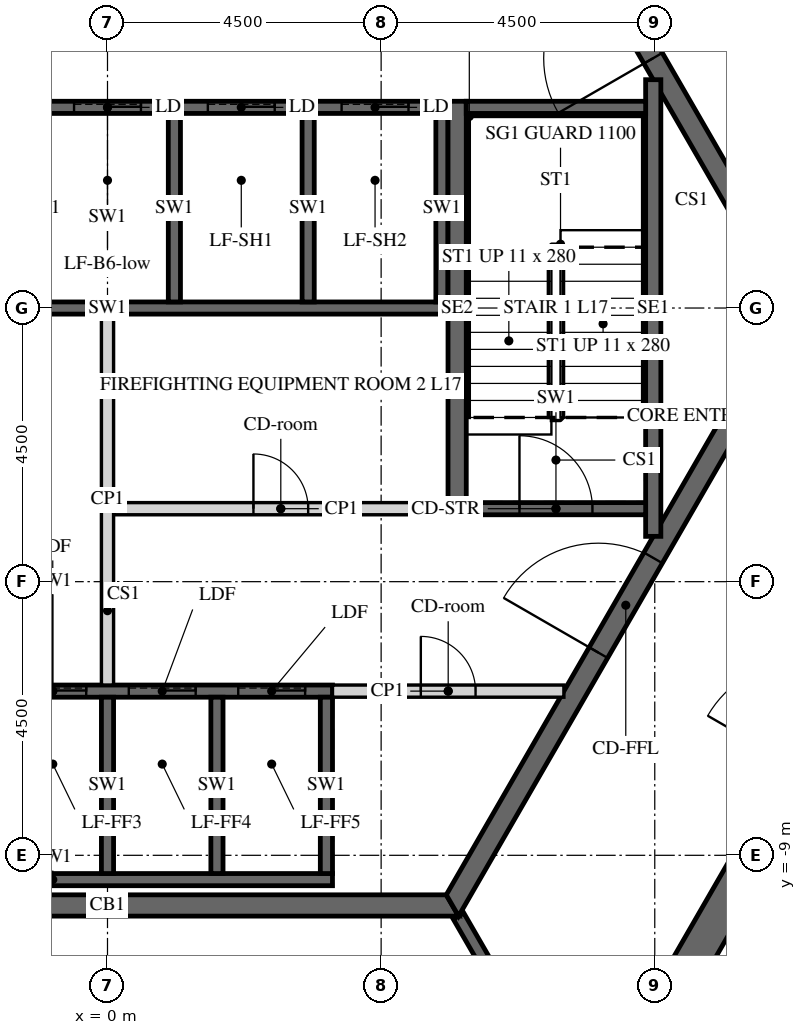
"""IFC4 building model, lengths in metres.
Left out: names, types, materials, properties, quantities, classifications, styles, units other than length and angle.
Written with IfcOpenShell. Run it as: python <this file> out.ifc"""

import sys

from ifc_helpers import new_model, si_unit, direction, frame, frame_2d, origin, place, context, subcontext, project, spatial, polyline, rectangle, outline, extrude, element, fill, save


model = new_model("IFC4")
c1 = context("Model", 3, precision=1e-05, world=origin(), true_north=direction((0.0, 1.0)))
c2 = subcontext(c1, "Body", "Model", "MODEL_VIEW")
j1 = project(units=[si_unit("LENGTHUNIT", "METRE"), si_unit("PLANEANGLEUNIT", "RADIAN")], contexts=[c1])
p1 = place(None, origin())
s1 = spatial("IfcSite", under=j1, at=p1, CompositionType="ELEMENT")
p2 = place(p1, origin())
s2 = spatial("IfcBuilding", under=s1, at=p2, CompositionType="ELEMENT")
p3 = place(p2, frame((0.0, 0.0, 80.4)))
s3 = spatial("IfcBuildingStorey", under=s2, at=p3, CompositionType="ELEMENT", Elevation=80.4)
p4 = place(p3, frame((7.91, -13.7, -0.15), z_axis=(0.0, 0.0, 1.0), x_axis=(0.499999880136, 0.866025472988, 0.0)))
e1 = element("IfcWall", 1, at=p4, inside=s3, PredefinedType="SHEAR", context=c2, shape_type="SweptSolid", body=[
    extrude(outline(polyline([(-0.173, -0.3), (15.993, -0.3), (15.646, 0.3), (0.173, 0.3), (-0.173, -0.3)])), origin(), (0.0, 0.0, 1.0), 3.9),
])
p5 = place(p4, frame((7.039, 0.0, 0.15)))
e2 = element("IfcOpeningElement", 2, at=p5, cuts=e1, PredefinedType="OPENING", context=c2, shape_type="SweptSolid", body=[
    extrude(rectangle(XDim=1.8, YDim=2.4, at=frame_2d((0.9, 1.2))), frame((0.0, 0.31, 0.0), z_axis=(0.0, -1.0, 0.0), x_axis=(1.0, 0.0, 0.0)), (0.0, 0.0, 1.0), 0.62),
])
p6 = place(p3, frame((15.819, 0.0, -0.15), z_axis=(0.0, 0.0, 1.0), x_axis=(-0.499999880136, 0.866025472988, 0.0)))
e3 = element("IfcWall", 3, at=p6, inside=s3, PredefinedType="SHEAR", context=c2, shape_type="SweptSolid", body=[
    extrude(outline(polyline([(-0.173, -0.3), (15.993, -0.3), (15.646, 0.3), (0.173, 0.3), (-0.173, -0.3)])), origin(), (0.0, 0.0, 1.0), 3.9),
])
p7 = place(p6, frame((6.981, 0.0, 0.15)))
e4 = element("IfcOpeningElement", 4, at=p7, cuts=e3, PredefinedType="OPENING", context=c2, shape_type="SweptSolid", body=[
    extrude(rectangle(XDim=1.8, YDim=2.4, at=frame_2d((0.9, 1.2))), frame((0.0, 0.31, 0.0), z_axis=(0.0, -1.0, 0.0), x_axis=(1.0, 0.0, 0.0)), (0.0, 0.0, 1.0), 0.62),
])
p8 = place(p3, frame((-5.673, -9.825, -0.15), z_axis=(0.0, 0.0, 1.0), x_axis=(1.0, 0.0, 0.0)))
e5 = element("IfcWall", 5, at=p8, inside=s3, PredefinedType="SHEAR", context=c2, shape_type="SweptSolid", body=[
    extrude(outline(polyline([(-0.101, -0.175), (11.446, -0.175), (11.244, 0.175), (0.101, 0.175), (-0.101, -0.175)])), origin(), (0.0, 0.0, 1.0), 3.9),
])
p9 = place(p3, frame((5.673, -9.825, -0.15), z_axis=(0.0, 0.0, 1.0), x_axis=(0.499995046907, 0.866028263435, 0.0)))
e6 = element("IfcWall", 6, at=p9, inside=s3, PredefinedType="SHEAR", context=c2, shape_type="SweptSolid", body=[
    extrude(outline(polyline([(-0.101, -0.175), (11.446, -0.175), (11.244, 0.175), (0.101, 0.175), (-0.101, -0.175)])), origin(), (0.0, 0.0, 1.0), 3.9),
])
p10 = place(p9, frame((4.801, 0.0, 0.15)))
e7 = element("IfcOpeningElement", 7, at=p10, cuts=e6, PredefinedType="OPENING", context=c2, shape_type="SweptSolid", body=[
    extrude(rectangle(XDim=1.8, YDim=2.4, at=frame_2d((0.9, 1.2))), frame((0.0, 0.185, 0.0), z_axis=(0.0, -1.0, 0.0), x_axis=(1.0, 0.0, 0.0)), (0.0, 0.0, 1.0), 0.37),
])
p11 = place(p3, frame((11.345, 0.0, -0.15), z_axis=(0.0, 0.0, 1.0), x_axis=(-0.499995046907, 0.866028263435, 0.0)))
e8 = element("IfcWall", 8, at=p11, inside=s3, PredefinedType="SHEAR", context=c2, shape_type="SweptSolid", body=[
    extrude(outline(polyline([(-0.101, -0.175), (11.446, -0.175), (11.244, 0.175), (0.101, 0.175), (-0.101, -0.175)])), origin(), (0.0, 0.0, 1.0), 3.9),
])
p12 = place(p11, frame((4.744, 0.0, 0.15)))
e9 = element("IfcOpeningElement", 9, at=p12, cuts=e8, PredefinedType="OPENING", context=c2, shape_type="SweptSolid", body=[
    extrude(rectangle(XDim=1.8, YDim=2.4, at=frame_2d((0.9, 1.2))), frame((0.0, 0.185, 0.0), z_axis=(0.0, -1.0, 0.0), x_axis=(1.0, 0.0, 0.0)), (0.0, 0.0, 1.0), 0.37),
])
p13 = place(p3, frame((-5.6, 3.3, -0.25), z_axis=(0.0, 0.0, 1.0), x_axis=(1.0, 0.0, 0.0)))
e10 = element("IfcWall", 10, at=p13, inside=s3, PredefinedType="SHEAR", context=c2, shape_type="SweptSolid", body=[
    extrude(rectangle(XDim=11.2, YDim=0.2, at=frame_2d((5.6, 0.0))), origin(), (0.0, 0.0, 1.0), 3.9),
])
p14 = place(p13, frame((0.65, 0.0, 0.25)))
e11 = element("IfcOpeningElement", 11, at=p14, cuts=e10, PredefinedType="OPENING", context=c2, shape_type="SweptSolid", body=[
    extrude(rectangle(XDim=1.1, YDim=2.1, at=frame_2d((0.55, 1.05))), frame((0.0, 0.11, 0.0), z_axis=(0.0, -1.0, 0.0), x_axis=(1.0, 0.0, 0.0)), (0.0, 0.0, 1.0), 0.22),
])
p15 = place(p13, frame((2.85, 0.0, 0.25)))
e12 = element("IfcOpeningElement", 12, at=p15, cuts=e10, PredefinedType="OPENING", context=c2, shape_type="SweptSolid", body=[
    extrude(rectangle(XDim=1.1, YDim=2.1, at=frame_2d((0.55, 1.05))), frame((0.0, 0.11, 0.0), z_axis=(0.0, -1.0, 0.0), x_axis=(1.0, 0.0, 0.0)), (0.0, 0.0, 1.0), 0.22),
])
p16 = place(p13, frame((5.05, 0.0, 0.25)))
e13 = element("IfcOpeningElement", 13, at=p16, cuts=e10, PredefinedType="OPENING", context=c2, shape_type="SweptSolid", body=[
    extrude(rectangle(XDim=1.1, YDim=2.1, at=frame_2d((0.55, 1.05))), frame((0.0, 0.11, 0.0), z_axis=(0.0, -1.0, 0.0), x_axis=(1.0, 0.0, 0.0)), (0.0, 0.0, 1.0), 0.22),
])
p17 = place(p13, frame((7.25, 0.0, 0.25)))
e14 = element("IfcOpeningElement", 14, at=p17, cuts=e10, PredefinedType="OPENING", context=c2, shape_type="SweptSolid", body=[
    extrude(rectangle(XDim=1.1, YDim=2.1, at=frame_2d((0.55, 1.05))), frame((0.0, 0.11, 0.0), z_axis=(0.0, -1.0, 0.0), x_axis=(1.0, 0.0, 0.0)), (0.0, 0.0, 1.0), 0.22),
])
p18 = place(p13, frame((9.45, 0.0, 0.25)))
e15 = element("IfcOpeningElement", 15, at=p18, cuts=e10, PredefinedType="OPENING", context=c2, shape_type="SweptSolid", body=[
    extrude(rectangle(XDim=1.1, YDim=2.1, at=frame_2d((0.55, 1.05))), frame((0.0, 0.11, 0.0), z_axis=(0.0, -1.0, 0.0), x_axis=(1.0, 0.0, 0.0)), (0.0, 0.0, 1.0), 0.22),
])
p19 = place(p3, frame((-5.6, 0.0, -0.25), z_axis=(0.0, 0.0, 1.0), x_axis=(1.0, 0.0, 0.0)))
e16 = element("IfcWall", 16, at=p19, inside=s3, PredefinedType="SHEAR", context=c2, shape_type="SweptSolid", body=[
    extrude(rectangle(XDim=11.2, YDim=0.2, at=frame_2d((5.6, 0.0))), origin(), (0.0, 0.0, 1.0), 3.9),
])
for number, where, z_axis, x_axis in (
    (17, (1.1, 0.1, -0.25), (0.0, 0.0, 1.0), (0.0, 1.0, 0.0)),
    (18, (3.3, 0.1, -0.25), (0.0, 0.0, 1.0), (0.0, 1.0, 0.0)),
    (19, (5.5, 0.1, -0.25), (0.0, 0.0, 1.0), (0.0, 1.0, 0.0)),
):
    element("IfcWall", number, at=place(p3, frame(where, z_axis=z_axis, x_axis=x_axis)), inside=s3, PredefinedType="SHEAR", context=c2, shape_type="SweptSolid", body=[
        extrude(rectangle(XDim=3.1, YDim=0.2, at=frame_2d((1.55, 0.0))), origin(), (0.0, 0.0, 1.0), 3.9),
    ])
p20 = place(p3, frame((-5.5, -6.3, -0.25), z_axis=(0.0, 0.0, 1.0), x_axis=(1.0, 0.0, 0.0)))
e20 = element("IfcWall", 20, at=p20, inside=s3, PredefinedType="SHEAR", context=c2, shape_type="SweptSolid", body=[
    extrude(rectangle(XDim=9.2, YDim=0.2, at=frame_2d((4.6, 0.0))), origin(), (0.0, 0.0, 1.0), 3.9),
])
p21 = place(p20, frame((0.45, 0.0, 0.25)))
e21 = element("IfcOpeningElement", 21, at=p21, cuts=e20, PredefinedType="OPENING", context=c2, shape_type="SweptSolid", body=[
    extrude(rectangle(XDim=1.1, YDim=2.1, at=frame_2d((0.55, 1.05))), frame((0.0, 0.11, 0.0), z_axis=(0.0, -1.0, 0.0), x_axis=(1.0, 0.0, 0.0)), (0.0, 0.0, 1.0), 0.22),
])
p22 = place(p20, frame((2.25, 0.0, 0.25)))
e22 = element("IfcOpeningElement", 22, at=p22, cuts=e20, PredefinedType="OPENING", context=c2, shape_type="SweptSolid", body=[
    extrude(rectangle(XDim=1.1, YDim=2.1, at=frame_2d((0.55, 1.05))), frame((0.0, 0.11, 0.0), z_axis=(0.0, -1.0, 0.0), x_axis=(1.0, 0.0, 0.0)), (0.0, 0.0, 1.0), 0.22),
])
p23 = place(p20, frame((4.05, 0.0, 0.25)))
e23 = element("IfcOpeningElement", 23, at=p23, cuts=e20, PredefinedType="OPENING", context=c2, shape_type="SweptSolid", body=[
    extrude(rectangle(XDim=1.1, YDim=2.1, at=frame_2d((0.55, 1.05))), frame((0.0, 0.11, 0.0), z_axis=(0.0, -1.0, 0.0), x_axis=(1.0, 0.0, 0.0)), (0.0, 0.0, 1.0), 0.22),
])
p24 = place(p20, frame((5.85, 0.0, 0.25)))
e24 = element("IfcOpeningElement", 24, at=p24, cuts=e20, PredefinedType="OPENING", context=c2, shape_type="SweptSolid", body=[
    extrude(rectangle(XDim=1.1, YDim=2.1, at=frame_2d((0.55, 1.05))), frame((0.0, 0.11, 0.0), z_axis=(0.0, -1.0, 0.0), x_axis=(1.0, 0.0, 0.0)), (0.0, 0.0, 1.0), 0.22),
])
p25 = place(p20, frame((7.65, 0.0, 0.25)))
e25 = element("IfcOpeningElement", 25, at=p25, cuts=e20, PredefinedType="OPENING", context=c2, shape_type="SweptSolid", body=[
    extrude(rectangle(XDim=1.1, YDim=2.1, at=frame_2d((0.55, 1.05))), frame((0.0, 0.11, 0.0), z_axis=(0.0, -1.0, 0.0), x_axis=(1.0, 0.0, 0.0)), (0.0, 0.0, 1.0), 0.22),
])
p26 = place(p3, frame((-5.5, -9.4, -0.25), z_axis=(0.0, 0.0, 1.0), x_axis=(1.0, 0.0, 0.0)))
e26 = element("IfcWall", 26, at=p26, inside=s3, PredefinedType="SHEAR", context=c2, shape_type="SweptSolid", body=[
    extrude(rectangle(XDim=9.2, YDim=0.2, at=frame_2d((4.6, 0.0))), origin(), (0.0, 0.0, 1.0), 3.9),
])
for number, where, z_axis, x_axis in (
    (27, (0.0, -9.3, -0.25), (0.0, 0.0, 1.0), (0.0, 1.0, 0.0)),
    (28, (1.8, -9.3, -0.25), (0.0, 0.0, 1.0), (0.0, 1.0, 0.0)),
    (29, (3.6, -9.3, -0.25), (0.0, 0.0, 1.0), (0.0, 1.0, 0.0)),
):
    element("IfcWall", number, at=place(p3, frame(where, z_axis=z_axis, x_axis=x_axis)), inside=s3, PredefinedType="SHEAR", context=c2, shape_type="SweptSolid", body=[
        extrude(rectangle(XDim=2.9, YDim=0.2, at=frame_2d((1.45, 0.0))), origin(), (0.0, 0.0, 1.0), 3.9),
    ])
p27 = place(p3, frame((0.1, -3.3, 0.0), z_axis=(0.0, 0.0, 1.0), x_axis=(1.0, 0.0, 0.0)))
e30 = element("IfcWall", 30, at=p27, inside=s3, PredefinedType="PARTITIONING", context=c2, shape_type="SweptSolid", body=[
    extrude(rectangle(XDim=5.5, YDim=0.2, at=frame_2d((2.75, 0.0))), origin(), (0.0, 0.0, 1.0), 3.65),
])
p28 = place(p27, frame((2.3, 0.0, 0.0)))
e31 = element("IfcOpeningElement", 31, at=p28, cuts=e30, PredefinedType="OPENING", context=c2, shape_type="SweptSolid", body=[
    extrude(rectangle(XDim=0.9, YDim=2.1, at=frame_2d((0.45, 1.05))), frame((0.0, 0.11, 0.0), z_axis=(0.0, -1.0, 0.0), x_axis=(1.0, 0.0, 0.0)), (0.0, 0.0, 1.0), 0.22),
])
p29 = place(p3, frame((0.0, -6.2, 0.0), z_axis=(0.0, 0.0, 1.0), x_axis=(0.0, 1.0, 0.0)))
e32 = element("IfcWall", 32, at=p29, inside=s3, PredefinedType="PARTITIONING", context=c2, shape_type="SweptSolid", body=[
    extrude(rectangle(XDim=6.1, YDim=0.2, at=frame_2d((3.05, 0.0))), origin(), (0.0, 0.0, 1.0), 3.65),
])
p30 = place(p3, frame((3.7, -6.3, 0.0), z_axis=(0.0, 0.0, 1.0), x_axis=(1.0, 0.0, 0.0)))
e33 = element("IfcWall", 33, at=p30, inside=s3, PredefinedType="PARTITIONING", context=c2, shape_type="SweptSolid", body=[
    extrude(rectangle(XDim=3.806, YDim=0.2, at=frame_2d((1.903, 0.0))), origin(), (0.0, 0.0, 1.0), 3.65),
])
p31 = place(p30, frame((1.453, 0.0, 0.0)))
e34 = element("IfcOpeningElement", 34, at=p31, cuts=e33, PredefinedType="OPENING", context=c2, shape_type="SweptSolid", body=[
    extrude(rectangle(XDim=0.9, YDim=2.1, at=frame_2d((0.45, 1.05))), frame((0.0, 0.11, 0.0), z_axis=(0.0, -1.0, 0.0), x_axis=(1.0, 0.0, 0.0)), (0.0, 0.0, 1.0), 0.22),
])
p32 = place(p3, frame((5.773, -10.0, -0.15), z_axis=(0.0, 0.0, 1.0), x_axis=(0.500038251005, -0.86600331843, 0.0)))
e35 = element("IfcWall", 35, at=p32, inside=s3, PredefinedType="SHEAR", context=c2, shape_type="SweptSolid", body=[
    extrude(rectangle(XDim=3.926, YDim=0.2, at=frame_2d((1.963, 0.0))), origin(), (0.0, 0.0, 1.0), 3.9),
])
p33 = place(p3, frame((5.75, -3.4, -0.25), z_axis=(0.0, 0.0, 1.0), x_axis=(0.0, 1.0, 0.0)))
e36 = element("IfcWall", 36, at=p33, inside=s3, PredefinedType="SHEAR", context=c2, shape_type="SweptSolid", body=[
    extrude(rectangle(XDim=6.8, YDim=0.3, at=frame_2d((3.4, 0.0))), origin(), (0.0, 0.0, 1.0), 3.9),
])
p34 = place(p3, frame((8.975, -3.755, -0.25), z_axis=(0.0, 0.0, 1.0), x_axis=(0.0, 1.0, 0.0)))
e37 = element("IfcWall", 37, at=p34, inside=s3, PredefinedType="SHEAR", context=c2, shape_type="SweptSolid", body=[
    extrude(rectangle(XDim=7.51, YDim=0.25, at=frame_2d((3.755, 0.0))), origin(), (0.0, 0.0, 1.0), 3.9),
])
p35 = place(p3, frame((5.9, 3.3, -0.25), z_axis=(0.0, 0.0, 1.0), x_axis=(1.0, 0.0, 0.0)))
e38 = element("IfcWall", 38, at=p35, inside=s3, PredefinedType="SHEAR", context=c2, shape_type="SweptSolid", body=[
    extrude(rectangle(XDim=2.95, YDim=0.2, at=frame_2d((1.475, 0.0))), origin(), (0.0, 0.0, 1.0), 3.9),
])
p36 = place(p3, frame((5.9, -3.3, -0.25), z_axis=(0.0, 0.0, 1.0), x_axis=(1.0, 0.0, 0.0)))
e39 = element("IfcWall", 39, at=p36, inside=s3, PredefinedType="SHEAR", context=c2, shape_type="SweptSolid", body=[
    extrude(rectangle(XDim=2.95, YDim=0.2, at=frame_2d((1.475, 0.0))), origin(), (0.0, 0.0, 1.0), 3.9),
])
p37 = place(p36, frame((0.875, 0.0, 0.25)))
e40 = element("IfcOpeningElement", 40, at=p37, cuts=e39, PredefinedType="OPENING", context=c2, shape_type="SweptSolid", body=[
    extrude(rectangle(XDim=1.2, YDim=2.4, at=frame_2d((0.6, 1.2))), frame((0.0, 0.11, 0.0), z_axis=(0.0, -1.0, 0.0), x_axis=(1.0, 0.0, 0.0)), (0.0, 0.0, 1.0), 0.22),
])
p38 = place(p12, origin())
e41 = element("IfcDoor", 41, at=p38, inside=s3, OperationType="DOUBLE_DOOR_SINGLE_SWING", PredefinedType="DOOR", context=c2, shape_type="SweptSolid", body=[
    extrude(rectangle(XDim=1.8, YDim=2.4, at=frame_2d((0.9, 1.2))), frame((0.0, 0.025, 0.0), z_axis=(0.0, -1.0, 0.0), x_axis=(1.0, 0.0, 0.0)), (0.0, 0.0, 1.0), 0.05),
])
fill(e9, e41)
p39 = place(p10, origin())
e42 = element("IfcDoor", 42, at=p39, inside=s3, OperationType="DOUBLE_DOOR_SINGLE_SWING", PredefinedType="DOOR", context=c2, shape_type="SweptSolid", body=[
    extrude(rectangle(XDim=1.8, YDim=2.4, at=frame_2d((0.9, 1.2))), frame((0.0, 0.025, 0.0), z_axis=(0.0, -1.0, 0.0), x_axis=(1.0, 0.0, 0.0)), (0.0, 0.0, 1.0), 0.05),
])
fill(e7, e42)
p40 = place(p28, origin())
e43 = element("IfcDoor", 43, at=p40, inside=s3, OperationType="SINGLE_SWING_LEFT", PredefinedType="DOOR", context=c2, shape_type="SweptSolid", body=[
    extrude(rectangle(XDim=0.9, YDim=2.1, at=frame_2d((0.45, 1.05))), frame((0.0, 0.025, 0.0), z_axis=(0.0, -1.0, 0.0), x_axis=(1.0, 0.0, 0.0)), (0.0, 0.0, 1.0), 0.05),
])
fill(e31, e43)
p41 = place(p31, origin())
e44 = element("IfcDoor", 44, at=p41, inside=s3, OperationType="SINGLE_SWING_LEFT", PredefinedType="DOOR", context=c2, shape_type="SweptSolid", body=[
    extrude(rectangle(XDim=0.9, YDim=2.1, at=frame_2d((0.45, 1.05))), frame((0.0, 0.025, 0.0), z_axis=(0.0, -1.0, 0.0), x_axis=(1.0, 0.0, 0.0)), (0.0, 0.0, 1.0), 0.05),
])
fill(e34, e44)
p42 = place(p37, origin())
e45 = element("IfcDoor", 45, at=p42, inside=s3, OperationType="SINGLE_SWING_LEFT", PredefinedType="DOOR", context=c2, shape_type="SweptSolid", body=[
    extrude(rectangle(XDim=1.2, YDim=2.4, at=frame_2d((0.6, 1.2))), frame((0.0, 0.025, 0.0), z_axis=(0.0, -1.0, 0.0), x_axis=(1.0, 0.0, 0.0)), (0.0, 0.0, 1.0), 0.05),
])
fill(e40, e45)
p43 = place(p16, origin())
e46 = element("IfcDoor", 46, at=p43, inside=s3, OperationType="SLIDING_TO_LEFT", PredefinedType="DOOR", context=c2, shape_type="SweptSolid", body=[
    extrude(rectangle(XDim=1.1, YDim=2.1, at=frame_2d((0.55, 1.05))), frame((0.0, 0.025, 0.0), z_axis=(0.0, -1.0, 0.0), x_axis=(1.0, 0.0, 0.0)), (0.0, 0.0, 1.0), 0.05),
])
fill(e13, e46)
p44 = place(p17, origin())
e47 = element("IfcDoor", 47, at=p44, inside=s3, OperationType="SLIDING_TO_LEFT", PredefinedType="DOOR", context=c2, shape_type="SweptSolid", body=[
    extrude(rectangle(XDim=1.1, YDim=2.1, at=frame_2d((0.55, 1.05))), frame((0.0, 0.025, 0.0), z_axis=(0.0, -1.0, 0.0), x_axis=(1.0, 0.0, 0.0)), (0.0, 0.0, 1.0), 0.05),
])
fill(e14, e47)
p45 = place(p18, origin())
e48 = element("IfcDoor", 48, at=p45, inside=s3, OperationType="SLIDING_TO_LEFT", PredefinedType="DOOR", context=c2, shape_type="SweptSolid", body=[
    extrude(rectangle(XDim=1.1, YDim=2.1, at=frame_2d((0.55, 1.05))), frame((0.0, 0.025, 0.0), z_axis=(0.0, -1.0, 0.0), x_axis=(1.0, 0.0, 0.0)), (0.0, 0.0, 1.0), 0.05),
])
fill(e15, e48)
p46 = place(p23, origin())
e49 = element("IfcDoor", 49, at=p46, inside=s3, OperationType="SLIDING_TO_LEFT", PredefinedType="DOOR", context=c2, shape_type="SweptSolid", body=[
    extrude(rectangle(XDim=1.1, YDim=2.1, at=frame_2d((0.55, 1.05))), frame((0.0, 0.025, 0.0), z_axis=(0.0, -1.0, 0.0), x_axis=(1.0, 0.0, 0.0)), (0.0, 0.0, 1.0), 0.05),
])
fill(e23, e49)
p47 = place(p24, origin())
e50 = element("IfcDoor", 50, at=p47, inside=s3, OperationType="SLIDING_TO_LEFT", PredefinedType="DOOR", context=c2, shape_type="SweptSolid", body=[
    extrude(rectangle(XDim=1.1, YDim=2.1, at=frame_2d((0.55, 1.05))), frame((0.0, 0.025, 0.0), z_axis=(0.0, -1.0, 0.0), x_axis=(1.0, 0.0, 0.0)), (0.0, 0.0, 1.0), 0.05),
])
fill(e24, e50)
p48 = place(p25, origin())
e51 = element("IfcDoor", 51, at=p48, inside=s3, OperationType="SLIDING_TO_LEFT", PredefinedType="DOOR", context=c2, shape_type="SweptSolid", body=[
    extrude(rectangle(XDim=1.1, YDim=2.1, at=frame_2d((0.55, 1.05))), frame((0.0, 0.025, 0.0), z_axis=(0.0, -1.0, 0.0), x_axis=(1.0, 0.0, 0.0)), (0.0, 0.0, 1.0), 0.05),
])
fill(e25, e51)
save(model, sys.argv[1])
